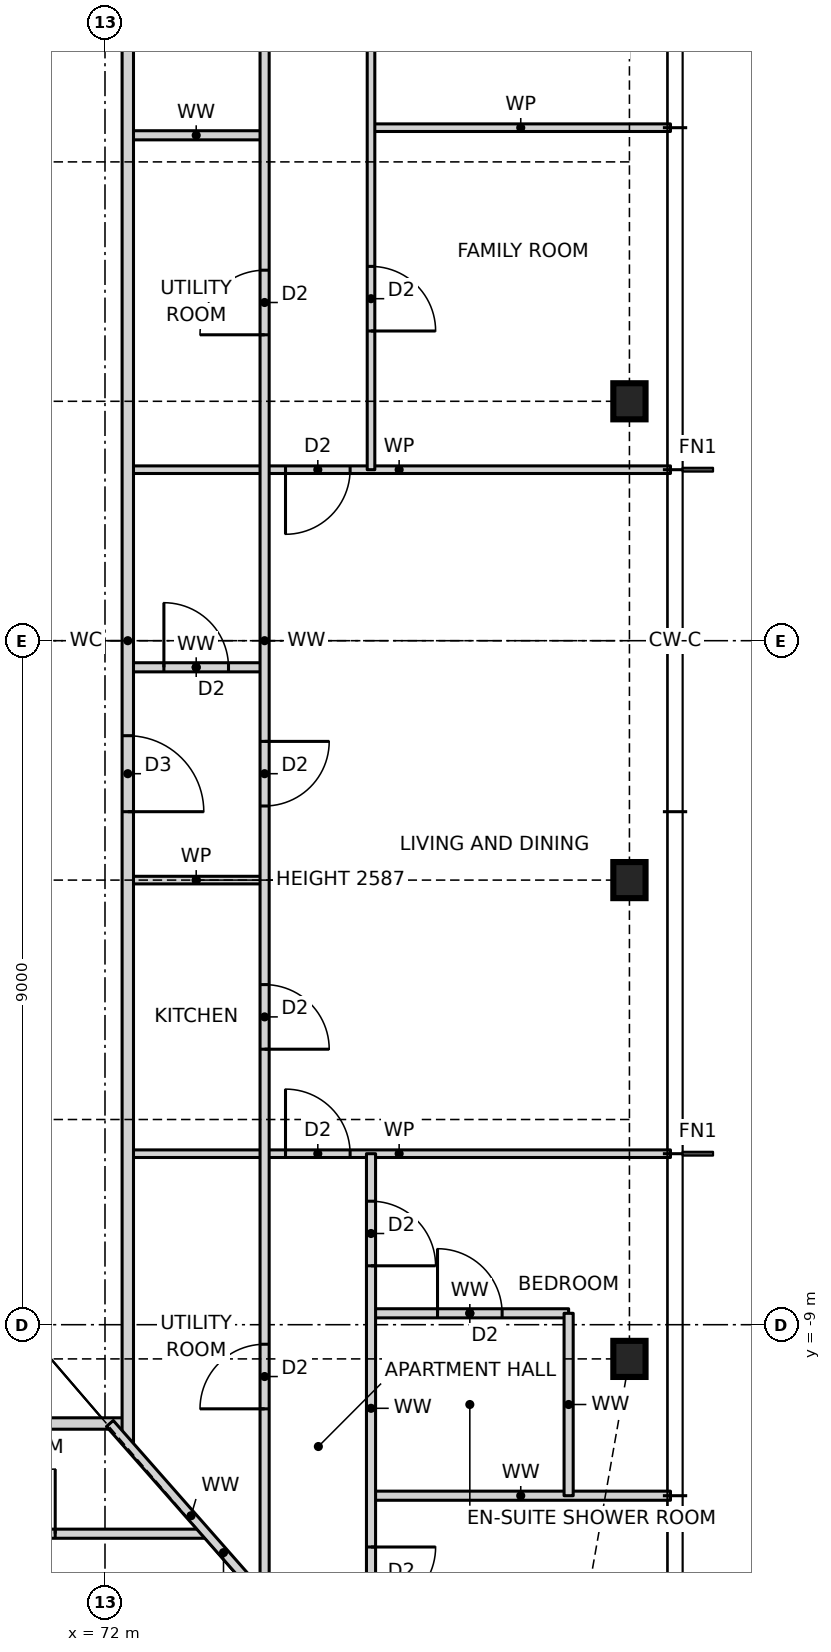
"""IFC4 building model, lengths in metres.
Left out: names, types, materials, properties, quantities, classifications, styles, units other than length and angle.
Written with IfcOpenShell. Run it as: python <this file> out.ifc"""

import sys

from ifc_helpers import new_model, si_unit, direction, frame, frame_2d, origin, origin_2d, place, context, subcontext, project, spatial, rectangle, i_section, extrude, element, fill, save


model = new_model("IFC4")
c1 = context("Model", 3, precision=1e-05, world=origin(), true_north=direction((0.0, 1.0)))
c2 = subcontext(c1, "Body", "Model", "MODEL_VIEW")
j1 = project(units=[si_unit("LENGTHUNIT", "METRE"), si_unit("PLANEANGLEUNIT", "RADIAN")], contexts=[c1])
p1 = place(None, origin())
s1 = spatial("IfcSite", under=j1, at=p1, CompositionType="ELEMENT")
p2 = place(p1, origin())
s2 = spatial("IfcBuilding", under=s1, at=p2, CompositionType="ELEMENT")
p3 = place(p2, frame((0.0, 0.0, 32.5)))
s3 = spatial("IfcBuildingStorey", under=s2, at=p3, CompositionType="ELEMENT", Elevation=32.5)
for number, where, z_axis, x_axis in (
    (1, (78.9, -9.45, 0.0), (0.0, 0.0, 1.0), (1.0, 0.0, 0.0)),
    (2, (78.9, -3.15, 0.0), (0.0, 0.0, 1.0), (1.0, 0.0, 0.0)),
    (3, (78.9, 3.15, 0.0), (0.0, 0.0, 1.0), (1.0, 0.0, 0.0)),
):
    element("IfcColumn", number, at=place(p3, frame(where, z_axis=z_axis, x_axis=x_axis)), inside=s3, PredefinedType="COLUMN", context=c2, shape_type="SweptSolid", body=[
        extrude(i_section(OverallWidth=0.424, OverallDepth=0.475, WebThickness=0.048, FlangeThickness=0.077, at=origin_2d()), origin(), (0.0, 0.0, 1.0), 3.5),
    ])
p4 = place(p3, frame((54.0, -11.75, 0.0), z_axis=(0.0, 0.0, 1.0), x_axis=(1.0, 0.0, 0.0)))
e4 = element("IfcWall", 4, at=p4, inside=s3, PredefinedType="PARTITIONING", context=c2, shape_type="SweptSolid", body=[
    extrude(rectangle(XDim=19.34, YDim=0.12, at=frame_2d((9.67, 0.0))), origin(), (0.0, 0.0, 1.0), 3.27),
])
p5 = place(p4, frame((1.375, 0.0, 0.0)))
e5 = element("IfcOpeningElement", 5, at=p5, cuts=e4, PredefinedType="OPENING", context=c2, shape_type="SweptSolid", body=[
    extrude(rectangle(XDim=0.85, YDim=2.1, at=frame_2d((0.425, 1.05))), frame((0.0, 0.07, 0.0), z_axis=(0.0, -1.0, 0.0), x_axis=(1.0, 0.0, 0.0)), (0.0, 0.0, 1.0), 0.14),
])
p6 = place(p4, frame((4.575, 0.0, 0.0)))
e6 = element("IfcOpeningElement", 6, at=p6, cuts=e4, PredefinedType="OPENING", context=c2, shape_type="SweptSolid", body=[
    extrude(rectangle(XDim=0.85, YDim=2.1, at=frame_2d((0.425, 1.05))), frame((0.0, 0.07, 0.0), z_axis=(0.0, -1.0, 0.0), x_axis=(1.0, 0.0, 0.0)), (0.0, 0.0, 1.0), 0.14),
])
p7 = place(p4, frame((11.325, 0.0, 0.0)))
e7 = element("IfcOpeningElement", 7, at=p7, cuts=e4, PredefinedType="OPENING", context=c2, shape_type="SweptSolid", body=[
    extrude(rectangle(XDim=0.85, YDim=2.1, at=frame_2d((0.425, 1.05))), frame((0.0, 0.07, 0.0), z_axis=(0.0, -1.0, 0.0), x_axis=(1.0, 0.0, 0.0)), (0.0, 0.0, 1.0), 0.14),
])
p8 = place(p4, frame((16.495, 0.0, 0.0)))
e8 = element("IfcOpeningElement", 8, at=p8, cuts=e4, PredefinedType="OPENING", context=c2, shape_type="SweptSolid", body=[
    extrude(rectangle(XDim=0.85, YDim=2.1, at=frame_2d((0.425, 1.05))), frame((0.0, 0.07, 0.0), z_axis=(0.0, -1.0, 0.0), x_axis=(1.0, 0.0, 0.0)), (0.0, 0.0, 1.0), 0.14),
])
p9 = place(p3, frame((75.5, -11.25, 0.0), z_axis=(0.0, 0.0, 1.0), x_axis=(1.0, 0.0, 0.0)))
e9 = element("IfcWall", 9, at=p9, inside=s3, PredefinedType="PARTITIONING", context=c2, shape_type="SweptSolid", body=[
    extrude(rectangle(XDim=3.94, YDim=0.12, at=frame_2d((1.97, 0.0))), origin(), (0.0, 0.0, 1.0), 3.27),
])
p10 = place(p3, frame((53.7, -10.3, 0.0), z_axis=(0.0, 0.0, 1.0), x_axis=(1.0, 0.0, 0.0)))
e10 = element("IfcWall", 10, at=p10, inside=s3, PredefinedType="PARTITIONING", context=c2, shape_type="SweptSolid", body=[
    extrude(rectangle(XDim=18.6, YDim=0.15, at=frame_2d((9.3, 0.0))), origin(), (0.0, 0.0, 1.0), 3.27),
])
p11 = place(p10, frame((4.8, 0.0, 0.0)))
e11 = element("IfcOpeningElement", 11, at=p11, cuts=e10, PredefinedType="OPENING", context=c2, shape_type="SweptSolid", body=[
    extrude(rectangle(XDim=1.0, YDim=2.1, at=frame_2d((0.5, 1.05))), frame((0.0, 0.085, 0.0), z_axis=(0.0, -1.0, 0.0), x_axis=(1.0, 0.0, 0.0)), (0.0, 0.0, 1.0), 0.17),
])
p12 = place(p3, frame((75.5, -8.85, 0.0), z_axis=(0.0, 0.0, 1.0), x_axis=(1.0, 0.0, 0.0)))
e12 = element("IfcWall", 12, at=p12, inside=s3, PredefinedType="PARTITIONING", context=c2, shape_type="SweptSolid", body=[
    extrude(rectangle(XDim=2.6, YDim=0.12, at=frame_2d((1.3, 0.0))), origin(), (0.0, 0.0, 1.0), 3.27),
])
p13 = place(p12, frame((0.875, 0.0, 0.0)))
e13 = element("IfcOpeningElement", 13, at=p13, cuts=e12, PredefinedType="OPENING", context=c2, shape_type="SweptSolid", body=[
    extrude(rectangle(XDim=0.85, YDim=2.1, at=frame_2d((0.425, 1.05))), frame((0.0, 0.07, 0.0), z_axis=(0.0, -1.0, 0.0), x_axis=(1.0, 0.0, 0.0)), (0.0, 0.0, 1.0), 0.14),
])
p14 = place(p3, frame((72.3, -6.75, 0.0), z_axis=(0.0, 0.0, 1.0), x_axis=(1.0, 0.0, 0.0)))
e14 = element("IfcWall", 14, at=p14, inside=s3, PredefinedType="PARTITIONING", context=c2, shape_type="SweptSolid", body=[
    extrude(rectangle(XDim=7.14, YDim=0.1, at=frame_2d((3.57, 0.0))), origin(), (0.0, 0.0, 1.0), 3.27),
])
p15 = place(p14, frame((2.075, 0.0, 0.0)))
e15 = element("IfcOpeningElement", 15, at=p15, cuts=e14, PredefinedType="OPENING", context=c2, shape_type="SweptSolid", body=[
    extrude(rectangle(XDim=0.85, YDim=2.1, at=frame_2d((0.425, 1.05))), frame((0.0, 0.06, 0.0), z_axis=(0.0, -1.0, 0.0), x_axis=(1.0, 0.0, 0.0)), (0.0, 0.0, 1.0), 0.12),
])
p16 = place(p3, frame((72.3, -3.15, 0.0), z_axis=(0.0, 0.0, 1.0), x_axis=(1.0, 0.0, 0.0)))
e16 = element("IfcWall", 16, at=p16, inside=s3, PredefinedType="PARTITIONING", context=c2, shape_type="SweptSolid", body=[
    extrude(rectangle(XDim=1.8, YDim=0.1, at=frame_2d((0.9, 0.0))), origin(), (0.0, 0.0, 1.0), 2.587),
])
p17 = place(p3, frame((72.3, -0.35, 0.0), z_axis=(0.0, 0.0, 1.0), x_axis=(1.0, 0.0, 0.0)))
e17 = element("IfcWall", 17, at=p17, inside=s3, PredefinedType="PARTITIONING", context=c2, shape_type="SweptSolid", body=[
    extrude(rectangle(XDim=1.8, YDim=0.12, at=frame_2d((0.9, 0.0))), origin(), (0.0, 0.0, 1.0), 3.27),
])
p18 = place(p17, frame((0.475, 0.0, 0.0)))
e18 = element("IfcOpeningElement", 18, at=p18, cuts=e17, PredefinedType="OPENING", context=c2, shape_type="SweptSolid", body=[
    extrude(rectangle(XDim=0.85, YDim=2.1, at=frame_2d((0.425, 1.05))), frame((0.0, 0.07, 0.0), z_axis=(0.0, -1.0, 0.0), x_axis=(1.0, 0.0, 0.0)), (0.0, 0.0, 1.0), 0.14),
])
p19 = place(p3, frame((72.3, 2.25, 0.0), z_axis=(0.0, 0.0, 1.0), x_axis=(1.0, 0.0, 0.0)))
e19 = element("IfcWall", 19, at=p19, inside=s3, PredefinedType="PARTITIONING", context=c2, shape_type="SweptSolid", body=[
    extrude(rectangle(XDim=7.14, YDim=0.1, at=frame_2d((3.57, 0.0))), origin(), (0.0, 0.0, 1.0), 3.27),
])
p20 = place(p19, frame((2.075, 0.0, 0.0)))
e20 = element("IfcOpeningElement", 20, at=p20, cuts=e19, PredefinedType="OPENING", context=c2, shape_type="SweptSolid", body=[
    extrude(rectangle(XDim=0.85, YDim=2.1, at=frame_2d((0.425, 1.05))), frame((0.0, 0.06, 0.0), z_axis=(0.0, -1.0, 0.0), x_axis=(1.0, 0.0, 0.0)), (0.0, 0.0, 1.0), 0.12),
])
p21 = place(p3, frame((72.3, 6.65, 0.0), z_axis=(0.0, 0.0, 1.0), x_axis=(1.0, 0.0, 0.0)))
e21 = element("IfcWall", 21, at=p21, inside=s3, PredefinedType="PARTITIONING", context=c2, shape_type="SweptSolid", body=[
    extrude(rectangle(XDim=1.8, YDim=0.12, at=frame_2d((0.9, 0.0))), origin(), (0.0, 0.0, 1.0), 3.27),
])
p22 = place(p3, frame((75.5, 6.75, 0.0), z_axis=(0.0, 0.0, 1.0), x_axis=(1.0, 0.0, 0.0)))
e22 = element("IfcWall", 22, at=p22, inside=s3, PredefinedType="PARTITIONING", context=c2, shape_type="SweptSolid", body=[
    extrude(rectangle(XDim=3.94, YDim=0.1, at=frame_2d((1.97, 0.0))), origin(), (0.0, 0.0, 1.0), 3.27),
])
p23 = place(p3, frame((78.1, -11.25, 0.0), z_axis=(0.0, 0.0, 1.0), x_axis=(0.0, 1.0, 0.0)))
e23 = element("IfcWall", 23, at=p23, inside=s3, PredefinedType="PARTITIONING", context=c2, shape_type="SweptSolid", body=[
    extrude(rectangle(XDim=2.4, YDim=0.12, at=frame_2d((1.2, 0.0))), origin(), (0.0, 0.0, 1.0), 3.27),
])
p24 = place(p3, frame((75.5, -13.45, 0.0), z_axis=(0.0, 0.0, 1.0), x_axis=(0.0, 1.0, 0.0)))
e24 = element("IfcWall", 24, at=p24, inside=s3, PredefinedType="PARTITIONING", context=c2, shape_type="SweptSolid", body=[
    extrude(rectangle(XDim=6.7, YDim=0.12, at=frame_2d((3.35, 0.0))), origin(), (0.0, 0.0, 1.0), 3.27),
])
p25 = place(p24, frame((5.225, 0.0, 0.0)))
e25 = element("IfcOpeningElement", 25, at=p25, cuts=e24, PredefinedType="OPENING", context=c2, shape_type="SweptSolid", body=[
    extrude(rectangle(XDim=0.85, YDim=2.1, at=frame_2d((0.425, 1.05))), frame((0.0, 0.07, 0.0), z_axis=(0.0, -1.0, 0.0), x_axis=(1.0, 0.0, 0.0)), (0.0, 0.0, 1.0), 0.14),
])
p26 = place(p24, frame((0.675, 0.0, 0.0)))
e26 = element("IfcOpeningElement", 26, at=p26, cuts=e24, PredefinedType="OPENING", context=c2, shape_type="SweptSolid", body=[
    extrude(rectangle(XDim=0.85, YDim=2.1, at=frame_2d((0.425, 1.05))), frame((0.0, 0.07, 0.0), z_axis=(0.0, -1.0, 0.0), x_axis=(1.0, 0.0, 0.0)), (0.0, 0.0, 1.0), 0.14),
])
p27 = place(p3, frame((75.5, 2.25, 0.0), z_axis=(0.0, 0.0, 1.0), x_axis=(0.0, 1.0, 0.0)))
e27 = element("IfcWall", 27, at=p27, inside=s3, PredefinedType="PARTITIONING", context=c2, shape_type="SweptSolid", body=[
    extrude(rectangle(XDim=11.2, YDim=0.1, at=frame_2d((5.6, 0.0))), origin(), (0.0, 0.0, 1.0), 3.27),
])
p28 = place(p27, frame((1.825, 0.0, 0.0)))
e28 = element("IfcOpeningElement", 28, at=p28, cuts=e27, PredefinedType="OPENING", context=c2, shape_type="SweptSolid", body=[
    extrude(rectangle(XDim=0.85, YDim=2.1, at=frame_2d((0.425, 1.05))), frame((0.0, 0.06, 0.0), z_axis=(0.0, -1.0, 0.0), x_axis=(1.0, 0.0, 0.0)), (0.0, 0.0, 1.0), 0.12),
])
p29 = place(p27, frame((6.325, 0.0, 0.0)))
e29 = element("IfcOpeningElement", 29, at=p29, cuts=e27, PredefinedType="OPENING", context=c2, shape_type="SweptSolid", body=[
    extrude(rectangle(XDim=0.85, YDim=2.1, at=frame_2d((0.425, 1.05))), frame((0.0, 0.06, 0.0), z_axis=(0.0, -1.0, 0.0), x_axis=(1.0, 0.0, 0.0)), (0.0, 0.0, 1.0), 0.12),
])
p30 = place(p27, frame((9.675, 0.0, 0.0)))
e30 = element("IfcOpeningElement", 30, at=p30, cuts=e27, PredefinedType="OPENING", context=c2, shape_type="SweptSolid", body=[
    extrude(rectangle(XDim=0.85, YDim=2.1, at=frame_2d((0.425, 1.05))), frame((0.0, 0.06, 0.0), z_axis=(0.0, -1.0, 0.0), x_axis=(1.0, 0.0, 0.0)), (0.0, 0.0, 1.0), 0.12),
])
p31 = place(p3, frame((74.1, -12.614, 0.0), z_axis=(0.0, 0.0, 1.0), x_axis=(0.0, 1.0, 0.0)))
e31 = element("IfcWall", 31, at=p31, inside=s3, PredefinedType="PARTITIONING", context=c2, shape_type="SweptSolid", body=[
    extrude(rectangle(XDim=25.228, YDim=0.12, at=frame_2d((12.614, 0.0))), origin(), (0.0, 0.0, 1.0), 3.27),
])
p32 = place(p31, frame((7.239, 0.0, 0.0)))
e32 = element("IfcOpeningElement", 32, at=p32, cuts=e31, PredefinedType="OPENING", context=c2, shape_type="SweptSolid", body=[
    extrude(rectangle(XDim=0.85, YDim=2.1, at=frame_2d((0.425, 1.05))), frame((0.0, 0.07, 0.0), z_axis=(0.0, -1.0, 0.0), x_axis=(1.0, 0.0, 0.0)), (0.0, 0.0, 1.0), 0.14),
])
p33 = place(p31, frame((10.439, 0.0, 0.0)))
e33 = element("IfcOpeningElement", 33, at=p33, cuts=e31, PredefinedType="OPENING", context=c2, shape_type="SweptSolid", body=[
    extrude(rectangle(XDim=0.85, YDim=2.1, at=frame_2d((0.425, 1.05))), frame((0.0, 0.07, 0.0), z_axis=(0.0, -1.0, 0.0), x_axis=(1.0, 0.0, 0.0)), (0.0, 0.0, 1.0), 0.14),
])
p34 = place(p31, frame((2.507, 0.0, 0.0)))
e34 = element("IfcOpeningElement", 34, at=p34, cuts=e31, PredefinedType="OPENING", context=c2, shape_type="SweptSolid", body=[
    extrude(rectangle(XDim=0.85, YDim=2.1, at=frame_2d((0.425, 1.05))), frame((0.0, 0.07, 0.0), z_axis=(0.0, -1.0, 0.0), x_axis=(1.0, 0.0, 0.0)), (0.0, 0.0, 1.0), 0.14),
])
p35 = place(p31, frame((16.639, 0.0, 0.0)))
e35 = element("IfcOpeningElement", 35, at=p35, cuts=e31, PredefinedType="OPENING", context=c2, shape_type="SweptSolid", body=[
    extrude(rectangle(XDim=0.85, YDim=2.1, at=frame_2d((0.425, 1.05))), frame((0.0, 0.07, 0.0), z_axis=(0.0, -1.0, 0.0), x_axis=(1.0, 0.0, 0.0)), (0.0, 0.0, 1.0), 0.14),
])
p36 = place(p31, frame((21.821, 0.0, 0.0)))
e36 = element("IfcOpeningElement", 36, at=p36, cuts=e31, PredefinedType="OPENING", context=c2, shape_type="SweptSolid", body=[
    extrude(rectangle(XDim=0.85, YDim=2.1, at=frame_2d((0.425, 1.05))), frame((0.0, 0.07, 0.0), z_axis=(0.0, -1.0, 0.0), x_axis=(1.0, 0.0, 0.0)), (0.0, 0.0, 1.0), 0.14),
])
p37 = place(p3, frame((72.3, -10.568, 0.0), z_axis=(0.0, 0.0, 1.0), x_axis=(0.0, 1.0, 0.0)))
e37 = element("IfcWall", 37, at=p37, inside=s3, PredefinedType="PARTITIONING", context=c2, shape_type="SweptSolid", body=[
    extrude(rectangle(XDim=21.136, YDim=0.15, at=frame_2d((10.568, 0.0))), origin(), (0.0, 0.0, 1.0), 3.27),
])
p38 = place(p37, frame((8.318, 0.0, 0.0)))
e38 = element("IfcOpeningElement", 38, at=p38, cuts=e37, PredefinedType="OPENING", context=c2, shape_type="SweptSolid", body=[
    extrude(rectangle(XDim=1.0, YDim=2.1, at=frame_2d((0.5, 1.05))), frame((0.0, 0.085, 0.0), z_axis=(0.0, -1.0, 0.0), x_axis=(1.0, 0.0, 0.0)), (0.0, 0.0, 1.0), 0.17),
])
p39 = place(p3, frame((74.2, -12.727, 0.0), z_axis=(0.0, 0.0, 1.0), x_axis=(-0.660667046586, 0.75067906162, 0.0)))
e39 = element("IfcWall", 39, at=p39, inside=s3, PredefinedType="PARTITIONING", context=c2, shape_type="SweptSolid", body=[
    extrude(rectangle(XDim=3.233, YDim=0.12, at=frame_2d((1.617, 0.0))), origin(), (0.0, 0.0, 1.0), 2.429),
])
p40 = place(p8, origin())
e40 = element("IfcDoor", 40, at=p40, inside=s3, OperationType="SINGLE_SWING_RIGHT", PredefinedType="DOOR", context=c2, shape_type="SweptSolid", body=[
    extrude(rectangle(XDim=0.85, YDim=2.1, at=frame_2d((0.425, 1.05))), frame((0.0, 0.025, 0.0), z_axis=(0.0, -1.0, 0.0), x_axis=(1.0, 0.0, 0.0)), (0.0, 0.0, 1.0), 0.05),
])
fill(e8, e40)
p41 = place(p32, frame((0.85, 0.0, 0.0), z_axis=(0.0, 0.0, 1.0), x_axis=(-1.0, 0.0, 0.0)))
e41 = element("IfcDoor", 41, at=p41, inside=s3, OperationType="SINGLE_SWING_RIGHT", PredefinedType="DOOR", context=c2, shape_type="SweptSolid", body=[
    extrude(rectangle(XDim=0.85, YDim=2.1, at=frame_2d((0.425, 1.05))), frame((0.0, 0.025, 0.0), z_axis=(0.0, -1.0, 0.0), x_axis=(1.0, 0.0, 0.0)), (0.0, 0.0, 1.0), 0.05),
])
fill(e32, e41)
p42 = place(p38, frame((1.0, 0.0, 0.0), z_axis=(0.0, 0.0, 1.0), x_axis=(-1.0, 0.0, 0.0)))
e42 = element("IfcDoor", 42, at=p42, inside=s3, OperationType="SINGLE_SWING_RIGHT", PredefinedType="DOOR", context=c2, shape_type="SweptSolid", body=[
    extrude(rectangle(XDim=1.0, YDim=2.1, at=frame_2d((0.5, 1.05))), frame((0.0, 0.025, 0.0), z_axis=(0.0, -1.0, 0.0), x_axis=(1.0, 0.0, 0.0)), (0.0, 0.0, 1.0), 0.05),
])
fill(e38, e42)
p43 = place(p33, frame((0.85, 0.0, 0.0), z_axis=(0.0, 0.0, 1.0), x_axis=(-1.0, 0.0, 0.0)))
e43 = element("IfcDoor", 43, at=p43, inside=s3, OperationType="SINGLE_SWING_LEFT", PredefinedType="DOOR", context=c2, shape_type="SweptSolid", body=[
    extrude(rectangle(XDim=0.85, YDim=2.1, at=frame_2d((0.425, 1.05))), frame((0.0, 0.025, 0.0), z_axis=(0.0, -1.0, 0.0), x_axis=(1.0, 0.0, 0.0)), (0.0, 0.0, 1.0), 0.05),
])
fill(e33, e43)
p44 = place(p18, origin())
e44 = element("IfcDoor", 44, at=p44, inside=s3, OperationType="SINGLE_SWING_LEFT", PredefinedType="DOOR", context=c2, shape_type="SweptSolid", body=[
    extrude(rectangle(XDim=0.85, YDim=2.1, at=frame_2d((0.425, 1.05))), frame((0.0, 0.025, 0.0), z_axis=(0.0, -1.0, 0.0), x_axis=(1.0, 0.0, 0.0)), (0.0, 0.0, 1.0), 0.05),
])
fill(e18, e44)
p45 = place(p15, origin())
e45 = element("IfcDoor", 45, at=p45, inside=s3, OperationType="SINGLE_SWING_LEFT", PredefinedType="DOOR", context=c2, shape_type="SweptSolid", body=[
    extrude(rectangle(XDim=0.85, YDim=2.1, at=frame_2d((0.425, 1.05))), frame((0.0, 0.025, 0.0), z_axis=(0.0, -1.0, 0.0), x_axis=(1.0, 0.0, 0.0)), (0.0, 0.0, 1.0), 0.05),
])
fill(e15, e45)
p46 = place(p13, origin())
e46 = element("IfcDoor", 46, at=p46, inside=s3, OperationType="SINGLE_SWING_LEFT", PredefinedType="DOOR", context=c2, shape_type="SweptSolid", body=[
    extrude(rectangle(XDim=0.85, YDim=2.1, at=frame_2d((0.425, 1.05))), frame((0.0, 0.025, 0.0), z_axis=(0.0, -1.0, 0.0), x_axis=(1.0, 0.0, 0.0)), (0.0, 0.0, 1.0), 0.05),
])
fill(e13, e46)
p47 = place(p25, frame((0.85, 0.0, 0.0), z_axis=(0.0, 0.0, 1.0), x_axis=(-1.0, 0.0, 0.0)))
e47 = element("IfcDoor", 47, at=p47, inside=s3, OperationType="SINGLE_SWING_RIGHT", PredefinedType="DOOR", context=c2, shape_type="SweptSolid", body=[
    extrude(rectangle(XDim=0.85, YDim=2.1, at=frame_2d((0.425, 1.05))), frame((0.0, 0.025, 0.0), z_axis=(0.0, -1.0, 0.0), x_axis=(1.0, 0.0, 0.0)), (0.0, 0.0, 1.0), 0.05),
])
fill(e25, e47)
p48 = place(p26, frame((0.85, 0.0, 0.0), z_axis=(0.0, 0.0, 1.0), x_axis=(-1.0, 0.0, 0.0)))
e48 = element("IfcDoor", 48, at=p48, inside=s3, OperationType="SINGLE_SWING_LEFT", PredefinedType="DOOR", context=c2, shape_type="SweptSolid", body=[
    extrude(rectangle(XDim=0.85, YDim=2.1, at=frame_2d((0.425, 1.05))), frame((0.0, 0.025, 0.0), z_axis=(0.0, -1.0, 0.0), x_axis=(1.0, 0.0, 0.0)), (0.0, 0.0, 1.0), 0.05),
])
fill(e26, e48)
p49 = place(p34, origin())
e49 = element("IfcDoor", 49, at=p49, inside=s3, OperationType="SINGLE_SWING_LEFT", PredefinedType="DOOR", context=c2, shape_type="SweptSolid", body=[
    extrude(rectangle(XDim=0.85, YDim=2.1, at=frame_2d((0.425, 1.05))), frame((0.0, 0.025, 0.0), z_axis=(0.0, -1.0, 0.0), x_axis=(1.0, 0.0, 0.0)), (0.0, 0.0, 1.0), 0.05),
])
fill(e34, e49)
p50 = place(p20, frame((0.85, 0.0, 0.0), z_axis=(0.0, 0.0, 1.0), x_axis=(-1.0, 0.0, 0.0)))
e50 = element("IfcDoor", 50, at=p50, inside=s3, OperationType="SINGLE_SWING_RIGHT", PredefinedType="DOOR", context=c2, shape_type="SweptSolid", body=[
    extrude(rectangle(XDim=0.85, YDim=2.1, at=frame_2d((0.425, 1.05))), frame((0.0, 0.025, 0.0), z_axis=(0.0, -1.0, 0.0), x_axis=(1.0, 0.0, 0.0)), (0.0, 0.0, 1.0), 0.05),
])
fill(e20, e50)
p51 = place(p28, frame((0.85, 0.0, 0.0), z_axis=(0.0, 0.0, 1.0), x_axis=(-1.0, 0.0, 0.0)))
e51 = element("IfcDoor", 51, at=p51, inside=s3, OperationType="SINGLE_SWING_RIGHT", PredefinedType="DOOR", context=c2, shape_type="SweptSolid", body=[
    extrude(rectangle(XDim=0.85, YDim=2.1, at=frame_2d((0.425, 1.05))), frame((0.0, 0.025, 0.0), z_axis=(0.0, -1.0, 0.0), x_axis=(1.0, 0.0, 0.0)), (0.0, 0.0, 1.0), 0.05),
])
fill(e28, e51)
p52 = place(p35, origin())
e52 = element("IfcDoor", 52, at=p52, inside=s3, OperationType="SINGLE_SWING_LEFT", PredefinedType="DOOR", context=c2, shape_type="SweptSolid", body=[
    extrude(rectangle(XDim=0.85, YDim=2.1, at=frame_2d((0.425, 1.05))), frame((0.0, 0.025, 0.0), z_axis=(0.0, -1.0, 0.0), x_axis=(1.0, 0.0, 0.0)), (0.0, 0.0, 1.0), 0.05),
])
fill(e35, e52)
save(model, sys.argv[1])
